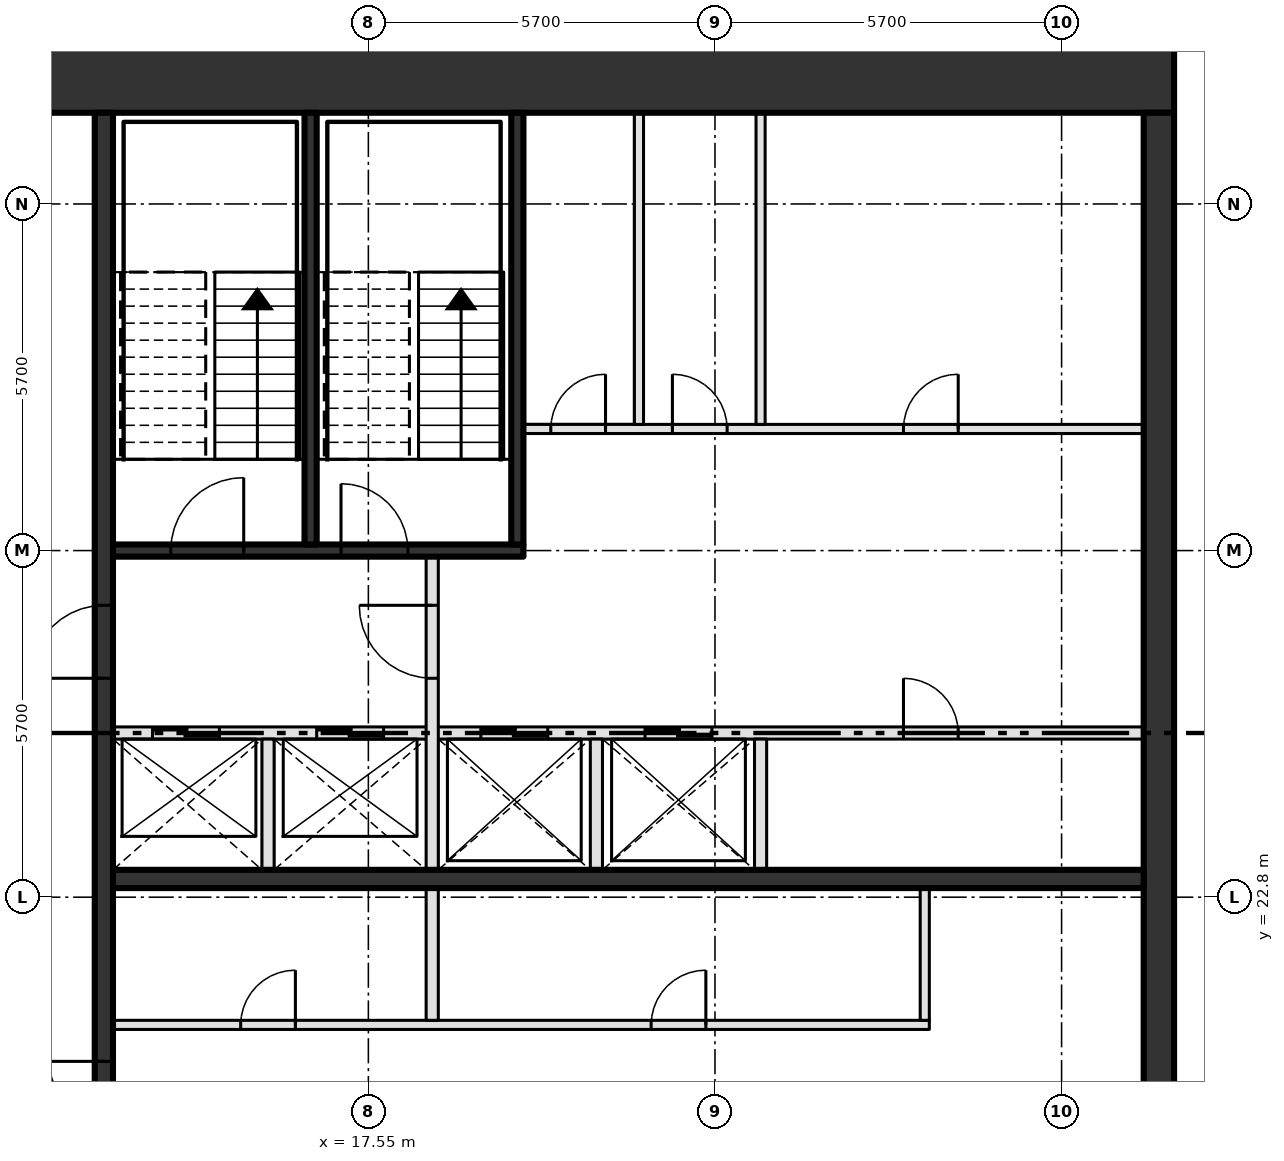
"""IFC4 building model, lengths in metres.
Left out: names, types, materials, properties, quantities, classifications, styles, units other than length and angle.
Written with IfcOpenShell. Run it as: python <this file> out.ifc"""

import sys

from ifc_helpers import new_model, si_unit, direction, frame, frame_2d, origin, place, context, subcontext, project, spatial, rectangle, extrude, element, fill, save


model = new_model("IFC4")
c1 = context("Model", 3, precision=1e-05, world=origin(), true_north=direction((0.0, 1.0)))
c2 = subcontext(c1, "Body", "Model", "MODEL_VIEW")
j1 = project(units=[si_unit("LENGTHUNIT", "METRE"), si_unit("PLANEANGLEUNIT", "RADIAN")], contexts=[c1])
p1 = place(None, origin())
s1 = spatial("IfcSite", under=j1, at=p1, CompositionType="ELEMENT")
p2 = place(p1, origin())
s2 = spatial("IfcBuilding", under=s1, at=p2, CompositionType="ELEMENT")
p3 = place(p2, frame((0.0, 0.0, 387.6)))
s3 = spatial("IfcBuildingStorey", under=s2, at=p3, CompositionType="ELEMENT", Elevation=387.6)
p4 = place(p3, frame((8.0, 36.3, -0.3), z_axis=(0.0, 0.0, 1.0), x_axis=(1.0, 0.0, 0.0)))
e1 = element("IfcWall", 1, at=p4, inside=s3, PredefinedType="SHEAR", context=c2, shape_type="SweptSolid", body=[
    extrude(rectangle(XDim=22.8, YDim=1.2, at=frame_2d((11.4, 0.0))), origin(), (0.0, 0.0, 1.0), 4.2),
])
p5 = place(p4, frame((2.3, 0.0, 0.3)))
e2 = element("IfcOpeningElement", 2, at=p5, cuts=e1, PredefinedType="OPENING", context=c2, shape_type="SweptSolid", body=[
    extrude(rectangle(XDim=1.8, YDim=2.1, at=frame_2d((0.9, 1.05))), frame((0.0, 0.61, 0.0), z_axis=(0.0, -1.0, 0.0), x_axis=(1.0, 0.0, 0.0)), (0.0, 0.0, 1.0), 1.22),
])
p6 = place(p3, frame((30.55, 14.6, -0.3), z_axis=(0.0, 0.0, 1.0), x_axis=(0.0, 1.0, 0.0)))
e3 = element("IfcWall", 3, at=p6, inside=s3, PredefinedType="SHEAR", context=c2, shape_type="SweptSolid", body=[
    extrude(rectangle(XDim=21.1, YDim=0.5, at=frame_2d((10.55, 0.0))), origin(), (0.0, 0.0, 1.0), 4.2),
])
p7 = place(p3, frame((13.35, 20.7, 0.0), z_axis=(0.0, 0.0, 1.0), x_axis=(1.0, 0.0, 0.0)))
e4 = element("IfcWall", 4, at=p7, inside=s3, PredefinedType="PARTITIONING", context=c2, shape_type="SweptSolid", body=[
    extrude(rectangle(XDim=13.425, YDim=0.15, at=frame_2d((6.712, 0.0))), origin(), (0.0, 0.0, 1.0), 3.9),
])
p8 = place(p7, frame((2.1, 0.0, 0.0)))
e5 = element("IfcOpeningElement", 5, at=p8, cuts=e4, PredefinedType="OPENING", context=c2, shape_type="SweptSolid", body=[
    extrude(rectangle(XDim=0.9, YDim=2.1, at=frame_2d((0.45, 1.05))), frame((0.0, 0.085, 0.0), z_axis=(0.0, -1.0, 0.0), x_axis=(1.0, 0.0, 0.0)), (0.0, 0.0, 1.0), 0.17),
])
p9 = place(p7, frame((8.85, 0.0, 0.0)))
e6 = element("IfcOpeningElement", 6, at=p9, cuts=e4, PredefinedType="OPENING", context=c2, shape_type="SweptSolid", body=[
    extrude(rectangle(XDim=0.9, YDim=2.1, at=frame_2d((0.45, 1.05))), frame((0.0, 0.085, 0.0), z_axis=(0.0, -1.0, 0.0), x_axis=(1.0, 0.0, 0.0)), (0.0, 0.0, 1.0), 0.17),
])
p10 = place(p3, frame((13.35, 23.1, 0.0), z_axis=(0.0, 0.0, 1.0), x_axis=(1.0, 0.0, 0.0)))
e7 = element("IfcWall", 7, at=p10, inside=s3, PredefinedType="SHEAR", context=c2, shape_type="SweptSolid", body=[
    extrude(rectangle(XDim=16.95, YDim=0.3, at=frame_2d((8.475, 0.0))), origin(), (0.0, 0.0, 1.0), 3.9),
])
p11 = place(p3, frame((13.35, 25.5, 0.0), z_axis=(0.0, 0.0, 1.0), x_axis=(1.0, 0.0, 0.0)))
e8 = element("IfcWall", 8, at=p11, inside=s3, PredefinedType="SOLIDWALL", context=c2, shape_type="SweptSolid", body=[
    extrude(rectangle(XDim=16.95, YDim=0.2, at=frame_2d((8.475, 0.0))), origin(), (0.0, 0.0, 1.0), 3.9),
])
p12 = place(p11, frame((0.65, 0.0, 0.0)))
e9 = element("IfcOpeningElement", 9, at=p12, cuts=e8, PredefinedType="OPENING", context=c2, shape_type="SweptSolid", body=[
    extrude(rectangle(XDim=1.1, YDim=2.1, at=frame_2d((0.55, 1.05))), frame((0.0, 0.11, 0.0), z_axis=(0.0, -1.0, 0.0), x_axis=(1.0, 0.0, 0.0)), (0.0, 0.0, 1.0), 0.22),
])
p13 = place(p11, frame((3.35, 0.0, 0.0)))
e10 = element("IfcOpeningElement", 10, at=p13, cuts=e8, PredefinedType="OPENING", context=c2, shape_type="SweptSolid", body=[
    extrude(rectangle(XDim=1.1, YDim=2.1, at=frame_2d((0.55, 1.05))), frame((0.0, 0.11, 0.0), z_axis=(0.0, -1.0, 0.0), x_axis=(1.0, 0.0, 0.0)), (0.0, 0.0, 1.0), 0.22),
])
p14 = place(p11, frame((6.05, 0.0, 0.0)))
e11 = element("IfcOpeningElement", 11, at=p14, cuts=e8, PredefinedType="OPENING", context=c2, shape_type="SweptSolid", body=[
    extrude(rectangle(XDim=1.1, YDim=2.1, at=frame_2d((0.55, 1.05))), frame((0.0, 0.11, 0.0), z_axis=(0.0, -1.0, 0.0), x_axis=(1.0, 0.0, 0.0)), (0.0, 0.0, 1.0), 0.22),
])
p15 = place(p11, frame((8.75, 0.0, 0.0)))
e12 = element("IfcOpeningElement", 12, at=p15, cuts=e8, PredefinedType="OPENING", context=c2, shape_type="SweptSolid", body=[
    extrude(rectangle(XDim=1.1, YDim=2.1, at=frame_2d((0.55, 1.05))), frame((0.0, 0.11, 0.0), z_axis=(0.0, -1.0, 0.0), x_axis=(1.0, 0.0, 0.0)), (0.0, 0.0, 1.0), 0.22),
])
p16 = place(p11, frame((13.0, 0.0, 0.0)))
e13 = element("IfcOpeningElement", 13, at=p16, cuts=e8, PredefinedType="OPENING", context=c2, shape_type="SweptSolid", body=[
    extrude(rectangle(XDim=0.9, YDim=2.1, at=frame_2d((0.45, 1.05))), frame((0.0, 0.11, 0.0), z_axis=(0.0, -1.0, 0.0), x_axis=(1.0, 0.0, 0.0)), (0.0, 0.0, 1.0), 0.22),
])
p17 = place(p3, frame((13.35, 28.5, 0.0), z_axis=(0.0, 0.0, 1.0), x_axis=(1.0, 0.0, 0.0)))
e14 = element("IfcWall", 14, at=p17, inside=s3, PredefinedType="SOLIDWALL", context=c2, shape_type="SweptSolid", body=[
    extrude(rectangle(XDim=6.75, YDim=0.2, at=frame_2d((3.375, 0.0))), origin(), (0.0, 0.0, 1.0), 3.9),
])
p18 = place(p17, frame((0.95, 0.0, 0.0)))
e15 = element("IfcOpeningElement", 15, at=p18, cuts=e14, PredefinedType="OPENING", context=c2, shape_type="SweptSolid", body=[
    extrude(rectangle(XDim=1.2, YDim=2.1, at=frame_2d((0.6, 1.05))), frame((0.0, 0.11, 0.0), z_axis=(0.0, -1.0, 0.0), x_axis=(1.0, 0.0, 0.0)), (0.0, 0.0, 1.0), 0.22),
])
p19 = place(p17, frame((3.75, 0.0, 0.0)))
e16 = element("IfcOpeningElement", 16, at=p19, cuts=e14, PredefinedType="OPENING", context=c2, shape_type="SweptSolid", body=[
    extrude(rectangle(XDim=1.1, YDim=2.1, at=frame_2d((0.55, 1.05))), frame((0.0, 0.11, 0.0), z_axis=(0.0, -1.0, 0.0), x_axis=(1.0, 0.0, 0.0)), (0.0, 0.0, 1.0), 0.22),
])
p20 = place(p3, frame((20.1, 30.5, 0.0), z_axis=(0.0, 0.0, 1.0), x_axis=(1.0, 0.0, 0.0)))
e17 = element("IfcWall", 17, at=p20, inside=s3, PredefinedType="PARTITIONING", context=c2, shape_type="SweptSolid", body=[
    extrude(rectangle(XDim=10.2, YDim=0.15, at=frame_2d((5.1, 0.0))), origin(), (0.0, 0.0, 1.0), 3.9),
])
p21 = place(p20, frame((0.45, 0.0, 0.0)))
e18 = element("IfcOpeningElement", 18, at=p21, cuts=e17, PredefinedType="OPENING", context=c2, shape_type="SweptSolid", body=[
    extrude(rectangle(XDim=0.9, YDim=2.1, at=frame_2d((0.45, 1.05))), frame((0.0, 0.085, 0.0), z_axis=(0.0, -1.0, 0.0), x_axis=(1.0, 0.0, 0.0)), (0.0, 0.0, 1.0), 0.17),
])
p22 = place(p20, frame((2.45, 0.0, 0.0)))
e19 = element("IfcOpeningElement", 19, at=p22, cuts=e17, PredefinedType="OPENING", context=c2, shape_type="SweptSolid", body=[
    extrude(rectangle(XDim=0.9, YDim=2.1, at=frame_2d((0.45, 1.05))), frame((0.0, 0.085, 0.0), z_axis=(0.0, -1.0, 0.0), x_axis=(1.0, 0.0, 0.0)), (0.0, 0.0, 1.0), 0.17),
])
p23 = place(p20, frame((6.25, 0.0, 0.0)))
e20 = element("IfcOpeningElement", 20, at=p23, cuts=e17, PredefinedType="OPENING", context=c2, shape_type="SweptSolid", body=[
    extrude(rectangle(XDim=0.9, YDim=2.1, at=frame_2d((0.45, 1.05))), frame((0.0, 0.085, 0.0), z_axis=(0.0, -1.0, 0.0), x_axis=(1.0, 0.0, 0.0)), (0.0, 0.0, 1.0), 0.17),
])
p24 = place(p3, frame((13.2, 14.6, 0.0), z_axis=(0.0, 0.0, 1.0), x_axis=(0.0, 1.0, 0.0)))
e21 = element("IfcWall", 21, at=p24, inside=s3, PredefinedType="SHEAR", context=c2, shape_type="SweptSolid", body=[
    extrude(rectangle(XDim=21.1, YDim=0.3, at=frame_2d((10.55, 0.0))), origin(), (0.0, 0.0, 1.0), 3.9),
])
p25 = place(p24, frame((3.7, 0.0, 0.0)))
e22 = element("IfcOpeningElement", 22, at=p25, cuts=e21, PredefinedType="OPENING", context=c2, shape_type="SweptSolid", body=[
    extrude(rectangle(XDim=1.8, YDim=2.1, at=frame_2d((0.9, 1.05))), frame((0.0, 0.16, 0.0), z_axis=(0.0, -1.0, 0.0), x_axis=(1.0, 0.0, 0.0)), (0.0, 0.0, 1.0), 0.32),
])
p26 = place(p24, frame((11.8, 0.0, 0.0)))
e23 = element("IfcOpeningElement", 23, at=p26, cuts=e21, PredefinedType="OPENING", context=c2, shape_type="SweptSolid", body=[
    extrude(rectangle(XDim=1.2, YDim=2.1, at=frame_2d((0.6, 1.05))), frame((0.0, 0.16, 0.0), z_axis=(0.0, -1.0, 0.0), x_axis=(1.0, 0.0, 0.0)), (0.0, 0.0, 1.0), 0.32),
])
p27 = place(p3, frame((15.9, 23.25, 0.0), z_axis=(0.0, 0.0, 1.0), x_axis=(0.0, 1.0, 0.0)))
e24 = element("IfcWall", 24, at=p27, inside=s3, PredefinedType="SOLIDWALL", context=c2, shape_type="SweptSolid", body=[
    extrude(rectangle(XDim=2.15, YDim=0.2, at=frame_2d((1.075, 0.0))), origin(), (0.0, 0.0, 1.0), 3.9),
])
p28 = place(p3, frame((16.6, 28.6, 0.0), z_axis=(0.0, 0.0, 1.0), x_axis=(0.0, 1.0, 0.0)))
e25 = element("IfcWall", 25, at=p28, inside=s3, PredefinedType="SOLIDWALL", context=c2, shape_type="SweptSolid", body=[
    extrude(rectangle(XDim=7.1, YDim=0.2, at=frame_2d((3.55, 0.0))), origin(), (0.0, 0.0, 1.0), 3.9),
])
p29 = place(p3, frame((18.6, 20.775, 0.0), z_axis=(0.0, 0.0, 1.0), x_axis=(0.0, 1.0, 0.0)))
e26 = element("IfcWall", 26, at=p29, inside=s3, PredefinedType="SOLIDWALL", context=c2, shape_type="SweptSolid", body=[
    extrude(rectangle(XDim=7.625, YDim=0.2, at=frame_2d((3.812, 0.0))), origin(), (0.0, 0.0, 1.0), 3.9),
])
p30 = place(p29, frame((5.625, 0.0, 0.0)))
e27 = element("IfcOpeningElement", 27, at=p30, cuts=e26, PredefinedType="OPENING", context=c2, shape_type="SweptSolid", body=[
    extrude(rectangle(XDim=1.2, YDim=2.1, at=frame_2d((0.6, 1.05))), frame((0.0, 0.11, 0.0), z_axis=(0.0, -1.0, 0.0), x_axis=(1.0, 0.0, 0.0)), (0.0, 0.0, 1.0), 0.22),
])
p31 = place(p3, frame((20.0, 28.6, 0.0), z_axis=(0.0, 0.0, 1.0), x_axis=(0.0, 1.0, 0.0)))
e28 = element("IfcWall", 28, at=p31, inside=s3, PredefinedType="SOLIDWALL", context=c2, shape_type="SweptSolid", body=[
    extrude(rectangle(XDim=7.1, YDim=0.2, at=frame_2d((3.55, 0.0))), origin(), (0.0, 0.0, 1.0), 3.9),
])
p32 = place(p3, frame((21.3, 23.25, 0.0), z_axis=(0.0, 0.0, 1.0), x_axis=(0.0, 1.0, 0.0)))
e29 = element("IfcWall", 29, at=p32, inside=s3, PredefinedType="SOLIDWALL", context=c2, shape_type="SweptSolid", body=[
    extrude(rectangle(XDim=2.15, YDim=0.2, at=frame_2d((1.075, 0.0))), origin(), (0.0, 0.0, 1.0), 3.9),
])
p33 = place(p3, frame((22.0, 30.575, 0.0), z_axis=(0.0, 0.0, 1.0), x_axis=(0.0, 1.0, 0.0)))
e30 = element("IfcWall", 30, at=p33, inside=s3, PredefinedType="PARTITIONING", context=c2, shape_type="SweptSolid", body=[
    extrude(rectangle(XDim=5.125, YDim=0.15, at=frame_2d((2.562, 0.0))), origin(), (0.0, 0.0, 1.0), 3.9),
])
p34 = place(p3, frame((24.0, 23.25, 0.0), z_axis=(0.0, 0.0, 1.0), x_axis=(0.0, 1.0, 0.0)))
e31 = element("IfcWall", 31, at=p34, inside=s3, PredefinedType="SOLIDWALL", context=c2, shape_type="SweptSolid", body=[
    extrude(rectangle(XDim=2.15, YDim=0.2, at=frame_2d((1.075, 0.0))), origin(), (0.0, 0.0, 1.0), 3.9),
])
p35 = place(p3, frame((24.0, 30.575, 0.0), z_axis=(0.0, 0.0, 1.0), x_axis=(0.0, 1.0, 0.0)))
e32 = element("IfcWall", 32, at=p35, inside=s3, PredefinedType="PARTITIONING", context=c2, shape_type="SweptSolid", body=[
    extrude(rectangle(XDim=5.125, YDim=0.15, at=frame_2d((2.562, 0.0))), origin(), (0.0, 0.0, 1.0), 3.9),
])
p36 = place(p3, frame((26.7, 20.775, 0.0), z_axis=(0.0, 0.0, 1.0), x_axis=(0.0, 1.0, 0.0)))
e33 = element("IfcWall", 33, at=p36, inside=s3, PredefinedType="PARTITIONING", context=c2, shape_type="SweptSolid", body=[
    extrude(rectangle(XDim=2.175, YDim=0.15, at=frame_2d((1.087, 0.0))), origin(), (0.0, 0.0, 1.0), 3.9),
])
p37 = place(p12, origin())
e34 = element("IfcDoor", 34, at=p37, inside=s3, OperationType="SLIDING_TO_LEFT", PredefinedType="DOOR", context=c2, shape_type="SweptSolid", body=[
    extrude(rectangle(XDim=1.1, YDim=2.1, at=frame_2d((0.55, 1.05))), frame((0.0, 0.025, 0.0), z_axis=(0.0, -1.0, 0.0), x_axis=(1.0, 0.0, 0.0)), (0.0, 0.0, 1.0), 0.05),
])
fill(e9, e34)
p38 = place(p13, origin())
e35 = element("IfcDoor", 35, at=p38, inside=s3, OperationType="SLIDING_TO_LEFT", PredefinedType="DOOR", context=c2, shape_type="SweptSolid", body=[
    extrude(rectangle(XDim=1.1, YDim=2.1, at=frame_2d((0.55, 1.05))), frame((0.0, 0.025, 0.0), z_axis=(0.0, -1.0, 0.0), x_axis=(1.0, 0.0, 0.0)), (0.0, 0.0, 1.0), 0.05),
])
fill(e10, e35)
p39 = place(p14, origin())
e36 = element("IfcDoor", 36, at=p39, inside=s3, OperationType="SLIDING_TO_LEFT", PredefinedType="DOOR", context=c2, shape_type="SweptSolid", body=[
    extrude(rectangle(XDim=1.1, YDim=2.1, at=frame_2d((0.55, 1.05))), frame((0.0, 0.025, 0.0), z_axis=(0.0, -1.0, 0.0), x_axis=(1.0, 0.0, 0.0)), (0.0, 0.0, 1.0), 0.05),
])
fill(e11, e36)
p40 = place(p15, origin())
e37 = element("IfcDoor", 37, at=p40, inside=s3, OperationType="SLIDING_TO_LEFT", PredefinedType="DOOR", context=c2, shape_type="SweptSolid", body=[
    extrude(rectangle(XDim=1.1, YDim=2.1, at=frame_2d((0.55, 1.05))), frame((0.0, 0.025, 0.0), z_axis=(0.0, -1.0, 0.0), x_axis=(1.0, 0.0, 0.0)), (0.0, 0.0, 1.0), 0.05),
])
fill(e12, e37)
p41 = place(p8, origin())
e38 = element("IfcDoor", 38, at=p41, inside=s3, OperationType="SINGLE_SWING_RIGHT", PredefinedType="DOOR", context=c2, shape_type="SweptSolid", body=[
    extrude(rectangle(XDim=0.9, YDim=2.1, at=frame_2d((0.45, 1.05))), frame((0.0, 0.025, 0.0), z_axis=(0.0, -1.0, 0.0), x_axis=(1.0, 0.0, 0.0)), (0.0, 0.0, 1.0), 0.05),
])
fill(e5, e38)
p42 = place(p9, origin())
e39 = element("IfcDoor", 39, at=p42, inside=s3, OperationType="SINGLE_SWING_RIGHT", PredefinedType="DOOR", context=c2, shape_type="SweptSolid", body=[
    extrude(rectangle(XDim=0.9, YDim=2.1, at=frame_2d((0.45, 1.05))), frame((0.0, 0.025, 0.0), z_axis=(0.0, -1.0, 0.0), x_axis=(1.0, 0.0, 0.0)), (0.0, 0.0, 1.0), 0.05),
])
fill(e6, e39)
p43 = place(p16, origin())
e40 = element("IfcDoor", 40, at=p43, inside=s3, OperationType="SINGLE_SWING_LEFT", PredefinedType="DOOR", context=c2, shape_type="SweptSolid", body=[
    extrude(rectangle(XDim=0.9, YDim=2.1, at=frame_2d((0.45, 1.05))), frame((0.0, 0.025, 0.0), z_axis=(0.0, -1.0, 0.0), x_axis=(1.0, 0.0, 0.0)), (0.0, 0.0, 1.0), 0.05),
])
fill(e13, e40)
p44 = place(p21, origin())
e41 = element("IfcDoor", 41, at=p44, inside=s3, OperationType="SINGLE_SWING_RIGHT", PredefinedType="DOOR", context=c2, shape_type="SweptSolid", body=[
    extrude(rectangle(XDim=0.9, YDim=2.1, at=frame_2d((0.45, 1.05))), frame((0.0, 0.025, 0.0), z_axis=(0.0, -1.0, 0.0), x_axis=(1.0, 0.0, 0.0)), (0.0, 0.0, 1.0), 0.05),
])
fill(e18, e41)
p45 = place(p22, origin())
e42 = element("IfcDoor", 42, at=p45, inside=s3, OperationType="SINGLE_SWING_LEFT", PredefinedType="DOOR", context=c2, shape_type="SweptSolid", body=[
    extrude(rectangle(XDim=0.9, YDim=2.1, at=frame_2d((0.45, 1.05))), frame((0.0, 0.025, 0.0), z_axis=(0.0, -1.0, 0.0), x_axis=(1.0, 0.0, 0.0)), (0.0, 0.0, 1.0), 0.05),
])
fill(e19, e42)
p46 = place(p23, origin())
e43 = element("IfcDoor", 43, at=p46, inside=s3, OperationType="SINGLE_SWING_RIGHT", PredefinedType="DOOR", context=c2, shape_type="SweptSolid", body=[
    extrude(rectangle(XDim=0.9, YDim=2.1, at=frame_2d((0.45, 1.05))), frame((0.0, 0.025, 0.0), z_axis=(0.0, -1.0, 0.0), x_axis=(1.0, 0.0, 0.0)), (0.0, 0.0, 1.0), 0.05),
])
fill(e20, e43)
p47 = place(p18, origin())
e44 = element("IfcDoor", 44, at=p47, inside=s3, OperationType="SINGLE_SWING_RIGHT", PredefinedType="DOOR", context=c2, shape_type="SweptSolid", body=[
    extrude(rectangle(XDim=1.2, YDim=2.1, at=frame_2d((0.6, 1.05))), frame((0.0, 0.025, 0.0), z_axis=(0.0, -1.0, 0.0), x_axis=(1.0, 0.0, 0.0)), (0.0, 0.0, 1.0), 0.05),
])
fill(e15, e44)
p48 = place(p19, origin())
e45 = element("IfcDoor", 45, at=p48, inside=s3, OperationType="SINGLE_SWING_LEFT", PredefinedType="DOOR", context=c2, shape_type="SweptSolid", body=[
    extrude(rectangle(XDim=1.1, YDim=2.1, at=frame_2d((0.55, 1.05))), frame((0.0, 0.025, 0.0), z_axis=(0.0, -1.0, 0.0), x_axis=(1.0, 0.0, 0.0)), (0.0, 0.0, 1.0), 0.05),
])
fill(e16, e45)
p49 = place(p25, origin())
e46 = element("IfcDoor", 46, at=p49, inside=s3, OperationType="DOUBLE_DOOR_SINGLE_SWING", PredefinedType="DOOR", context=c2, shape_type="SweptSolid", body=[
    extrude(rectangle(XDim=1.8, YDim=2.1, at=frame_2d((0.9, 1.05))), frame((0.0, 0.025, 0.0), z_axis=(0.0, -1.0, 0.0), x_axis=(1.0, 0.0, 0.0)), (0.0, 0.0, 1.0), 0.05),
])
fill(e22, e46)
p50 = place(p26, origin())
e47 = element("IfcDoor", 47, at=p50, inside=s3, OperationType="SINGLE_SWING_LEFT", PredefinedType="DOOR", context=c2, shape_type="SweptSolid", body=[
    extrude(rectangle(XDim=1.2, YDim=2.1, at=frame_2d((0.6, 1.05))), frame((0.0, 0.025, 0.0), z_axis=(0.0, -1.0, 0.0), x_axis=(1.0, 0.0, 0.0)), (0.0, 0.0, 1.0), 0.05),
])
fill(e23, e47)
p51 = place(p30, origin())
e48 = element("IfcDoor", 48, at=p51, inside=s3, OperationType="SINGLE_SWING_RIGHT", PredefinedType="DOOR", context=c2, shape_type="SweptSolid", body=[
    extrude(rectangle(XDim=1.2, YDim=2.1, at=frame_2d((0.6, 1.05))), frame((0.0, 0.025, 0.0), z_axis=(0.0, -1.0, 0.0), x_axis=(1.0, 0.0, 0.0)), (0.0, 0.0, 1.0), 0.05),
])
fill(e27, e48)
save(model, sys.argv[1])
